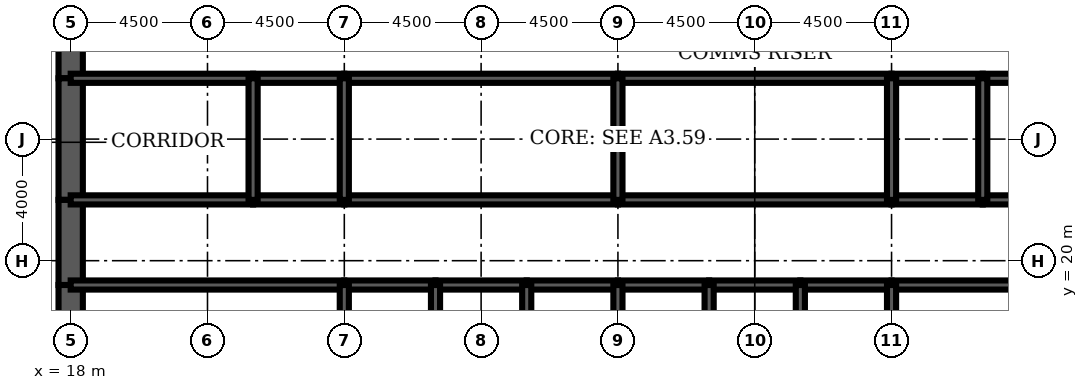
"""IFC4 building model, lengths in metres.
Left out: names, types, materials, properties, quantities, classifications, styles, units other than length and angle.
Written with IfcOpenShell. Run it as: python <this file> out.ifc"""

import sys

from ifc_helpers import new_model, si_unit, direction, frame, frame_2d, origin, place, context, subcontext, project, spatial, rectangle, extrude, element, fill, save


model = new_model("IFC4")
c1 = context("Model", 3, precision=1e-05, world=origin(), true_north=direction((0.0, 1.0)))
c2 = subcontext(c1, "Body", "Model", "MODEL_VIEW")
j1 = project(units=[si_unit("LENGTHUNIT", "METRE"), si_unit("PLANEANGLEUNIT", "RADIAN")], contexts=[c1])
p1 = place(None, origin())
s1 = spatial("IfcSite", under=j1, at=p1, CompositionType="ELEMENT")
p2 = place(p1, origin())
s2 = spatial("IfcBuilding", under=s1, at=p2, CompositionType="ELEMENT")
p3 = place(p2, frame((0.0, 0.0, 253.0)))
s3 = spatial("IfcBuildingStorey", under=s2, at=p3, CompositionType="ELEMENT", Elevation=253.0)
p4 = place(p3, frame((18.0, 28.8, 0.0), z_axis=(0.0, 0.0, 1.0), x_axis=(0.0, -1.0, 0.0)))
e1 = element("IfcWall", 1, at=p4, inside=s3, PredefinedType="SHEAR", context=c2, shape_type="SweptSolid", body=[
    extrude(rectangle(XDim=2.8, YDim=0.8, at=frame_2d((1.4, 0.0))), origin(), (0.0, 0.0, 1.0), 4.2),
])
p5 = place(p4, frame((0.4, 0.0, 0.0)))
e2 = element("IfcOpeningElement", 2, at=p5, cuts=e1, PredefinedType="OPENING", context=c2, shape_type="SweptSolid", body=[
    extrude(rectangle(XDim=1.8, YDim=2.1, at=frame_2d((0.9, 1.05))), frame((0.0, 0.41, 0.0), z_axis=(0.0, -1.0, 0.0), x_axis=(1.0, 0.0, 0.0)), (0.0, 0.0, 1.0), 0.82),
])
p6 = place(p3, frame((18.0, 26.0, 0.0), z_axis=(0.0, 0.0, 1.0), x_axis=(0.0, -1.0, 0.0)))
e3 = element("IfcWall", 3, at=p6, inside=s3, PredefinedType="SHEAR", context=c2, shape_type="SweptSolid", body=[
    extrude(rectangle(XDim=4.0, YDim=0.8, at=frame_2d((2.0, 0.0))), origin(), (0.0, 0.0, 1.0), 4.2),
])
p7 = place(p3, frame((18.0, 22.0, 0.0), z_axis=(0.0, 0.0, 1.0), x_axis=(0.0, -1.0, 0.0)))
e4 = element("IfcWall", 4, at=p7, inside=s3, PredefinedType="SHEAR", context=c2, shape_type="SweptSolid", body=[
    extrude(rectangle(XDim=2.8, YDim=0.8, at=frame_2d((1.4, 0.0))), origin(), (0.0, 0.0, 1.0), 4.2),
])
p8 = place(p7, frame((0.6, 0.0, 0.0)))
e5 = element("IfcOpeningElement", 5, at=p8, cuts=e4, PredefinedType="OPENING", context=c2, shape_type="SweptSolid", body=[
    extrude(rectangle(XDim=1.8, YDim=2.1, at=frame_2d((0.9, 1.05))), frame((0.0, 0.41, 0.0), z_axis=(0.0, -1.0, 0.0), x_axis=(1.0, 0.0, 0.0)), (0.0, 0.0, 1.0), 0.82),
])
p9 = place(p3, frame((18.0, 19.2, 0.0), z_axis=(0.0, 0.0, 1.0), x_axis=(0.0, -1.0, 0.0)))
e6 = element("IfcWall", 6, at=p9, inside=s3, PredefinedType="SHEAR", context=c2, shape_type="SweptSolid", body=[
    extrude(rectangle(XDim=3.2, YDim=0.8, at=frame_2d((1.6, 0.0))), origin(), (0.0, 0.0, 1.0), 4.2),
])
p10 = place(p3, frame((18.0, 19.2, 0.0), z_axis=(0.0, 0.0, 1.0), x_axis=(1.0, 0.0, 0.0)))
e7 = element("IfcWall", 7, at=p10, inside=s3, PredefinedType="SOLIDWALL", context=c2, shape_type="SweptSolid", body=[
    extrude(rectangle(XDim=9.0, YDim=0.3, at=frame_2d((4.5, 0.0))), origin(), (0.0, 0.0, 1.0), 4.2),
])
p11 = place(p10, frame((0.65, 0.0, 0.0)))
e8 = element("IfcOpeningElement", 8, at=p11, cuts=e7, PredefinedType="OPENING", context=c2, shape_type="SweptSolid", body=[
    extrude(rectangle(XDim=1.0, YDim=2.1, at=frame_2d((0.5, 1.05))), frame((0.0, 0.16, 0.0), z_axis=(0.0, -1.0, 0.0), x_axis=(1.0, 0.0, 0.0)), (0.0, 0.0, 1.0), 0.32),
])
p12 = place(p3, frame((27.0, 19.2, 0.0), z_axis=(0.0, 0.0, 1.0), x_axis=(1.0, 0.0, 0.0)))
e9 = element("IfcWall", 9, at=p12, inside=s3, PredefinedType="SOLIDWALL", context=c2, shape_type="SweptSolid", body=[
    extrude(rectangle(XDim=3.0, YDim=0.3, at=frame_2d((1.5, 0.0))), origin(), (0.0, 0.0, 1.0), 4.2),
])
p13 = place(p12, frame((0.95, 0.0, 0.0)))
e10 = element("IfcOpeningElement", 10, at=p13, cuts=e9, PredefinedType="OPENING", context=c2, shape_type="SweptSolid", body=[
    extrude(rectangle(XDim=1.1, YDim=2.2, at=frame_2d((0.55, 1.1))), frame((0.0, 0.16, 0.0), z_axis=(0.0, -1.0, 0.0), x_axis=(1.0, 0.0, 0.0)), (0.0, 0.0, 1.0), 0.32),
])
p14 = place(p3, frame((30.0, 19.2, 0.0), z_axis=(0.0, 0.0, 1.0), x_axis=(1.0, 0.0, 0.0)))
e11 = element("IfcWall", 11, at=p14, inside=s3, PredefinedType="SOLIDWALL", context=c2, shape_type="SweptSolid", body=[
    extrude(rectangle(XDim=3.0, YDim=0.3, at=frame_2d((1.5, 0.0))), origin(), (0.0, 0.0, 1.0), 4.2),
])
p15 = place(p14, frame((0.95, 0.0, 0.0)))
e12 = element("IfcOpeningElement", 12, at=p15, cuts=e11, PredefinedType="OPENING", context=c2, shape_type="SweptSolid", body=[
    extrude(rectangle(XDim=1.1, YDim=2.2, at=frame_2d((0.55, 1.1))), frame((0.0, 0.16, 0.0), z_axis=(0.0, -1.0, 0.0), x_axis=(1.0, 0.0, 0.0)), (0.0, 0.0, 1.0), 0.32),
])
p16 = place(p3, frame((33.0, 19.2, 0.0), z_axis=(0.0, 0.0, 1.0), x_axis=(1.0, 0.0, 0.0)))
e13 = element("IfcWall", 13, at=p16, inside=s3, PredefinedType="SOLIDWALL", context=c2, shape_type="SweptSolid", body=[
    extrude(rectangle(XDim=3.0, YDim=0.3, at=frame_2d((1.5, 0.0))), origin(), (0.0, 0.0, 1.0), 4.2),
])
p17 = place(p16, frame((0.95, 0.0, 0.0)))
e14 = element("IfcOpeningElement", 14, at=p17, cuts=e13, PredefinedType="OPENING", context=c2, shape_type="SweptSolid", body=[
    extrude(rectangle(XDim=1.1, YDim=2.2, at=frame_2d((0.55, 1.1))), frame((0.0, 0.16, 0.0), z_axis=(0.0, -1.0, 0.0), x_axis=(1.0, 0.0, 0.0)), (0.0, 0.0, 1.0), 0.32),
])
p18 = place(p3, frame((36.0, 19.2, 0.0), z_axis=(0.0, 0.0, 1.0), x_axis=(1.0, 0.0, 0.0)))
e15 = element("IfcWall", 15, at=p18, inside=s3, PredefinedType="SOLIDWALL", context=c2, shape_type="SweptSolid", body=[
    extrude(rectangle(XDim=3.0, YDim=0.3, at=frame_2d((1.5, 0.0))), origin(), (0.0, 0.0, 1.0), 4.2),
])
p19 = place(p18, frame((0.95, 0.0, 0.0)))
e16 = element("IfcOpeningElement", 16, at=p19, cuts=e15, PredefinedType="OPENING", context=c2, shape_type="SweptSolid", body=[
    extrude(rectangle(XDim=1.1, YDim=2.2, at=frame_2d((0.55, 1.1))), frame((0.0, 0.16, 0.0), z_axis=(0.0, -1.0, 0.0), x_axis=(1.0, 0.0, 0.0)), (0.0, 0.0, 1.0), 0.32),
])
p20 = place(p3, frame((39.0, 19.2, 0.0), z_axis=(0.0, 0.0, 1.0), x_axis=(1.0, 0.0, 0.0)))
e17 = element("IfcWall", 17, at=p20, inside=s3, PredefinedType="SOLIDWALL", context=c2, shape_type="SweptSolid", body=[
    extrude(rectangle(XDim=3.0, YDim=0.3, at=frame_2d((1.5, 0.0))), origin(), (0.0, 0.0, 1.0), 4.2),
])
p21 = place(p20, frame((1.0, 0.0, 0.0)))
e18 = element("IfcOpeningElement", 18, at=p21, cuts=e17, PredefinedType="OPENING", context=c2, shape_type="SweptSolid", body=[
    extrude(rectangle(XDim=1.0, YDim=2.1, at=frame_2d((0.5, 1.05))), frame((0.0, 0.16, 0.0), z_axis=(0.0, -1.0, 0.0), x_axis=(1.0, 0.0, 0.0)), (0.0, 0.0, 1.0), 0.32),
])
p22 = place(p3, frame((42.0, 19.2, 0.0), z_axis=(0.0, 0.0, 1.0), x_axis=(1.0, 0.0, 0.0)))
e19 = element("IfcWall", 19, at=p22, inside=s3, PredefinedType="SOLIDWALL", context=c2, shape_type="SweptSolid", body=[
    extrude(rectangle(XDim=3.0, YDim=0.3, at=frame_2d((1.5, 0.0))), origin(), (0.0, 0.0, 1.0), 4.2),
])
p23 = place(p22, frame((1.0, 0.0, 0.0)))
e20 = element("IfcOpeningElement", 20, at=p23, cuts=e19, PredefinedType="OPENING", context=c2, shape_type="SweptSolid", body=[
    extrude(rectangle(XDim=1.0, YDim=2.1, at=frame_2d((0.5, 1.05))), frame((0.0, 0.16, 0.0), z_axis=(0.0, -1.0, 0.0), x_axis=(1.0, 0.0, 0.0)), (0.0, 0.0, 1.0), 0.32),
])
p24 = place(p3, frame((45.0, 19.2, 0.0), z_axis=(0.0, 0.0, 1.0), x_axis=(1.0, 0.0, 0.0)))
e21 = element("IfcWall", 21, at=p24, inside=s3, PredefinedType="SOLIDWALL", context=c2, shape_type="SweptSolid", body=[
    extrude(rectangle(XDim=9.0, YDim=0.3, at=frame_2d((4.5, 0.0))), origin(), (0.0, 0.0, 1.0), 4.2),
])
p25 = place(p24, frame((7.35, 0.0, 0.0)))
e22 = element("IfcOpeningElement", 22, at=p25, cuts=e21, PredefinedType="OPENING", context=c2, shape_type="SweptSolid", body=[
    extrude(rectangle(XDim=1.0, YDim=2.1, at=frame_2d((0.5, 1.05))), frame((0.0, 0.16, 0.0), z_axis=(0.0, -1.0, 0.0), x_axis=(1.0, 0.0, 0.0)), (0.0, 0.0, 1.0), 0.32),
])
p26 = place(p3, frame((18.0, 22.0, 0.0), z_axis=(0.0, 0.0, 1.0), x_axis=(1.0, 0.0, 0.0)))
e23 = element("IfcWall", 23, at=p26, inside=s3, PredefinedType="SOLIDWALL", context=c2, shape_type="SweptSolid", body=[
    extrude(rectangle(XDim=6.0, YDim=0.3, at=frame_2d((3.0, 0.0))), origin(), (0.0, 0.0, 1.0), 4.2),
])
p27 = place(p26, frame((2.0, 0.0, 0.0)))
e24 = element("IfcOpeningElement", 24, at=p27, cuts=e23, PredefinedType="OPENING", context=c2, shape_type="SweptSolid", body=[
    extrude(rectangle(XDim=1.0, YDim=2.1, at=frame_2d((0.5, 1.05))), frame((0.0, 0.16, 0.0), z_axis=(0.0, -1.0, 0.0), x_axis=(1.0, 0.0, 0.0)), (0.0, 0.0, 1.0), 0.32),
])
p28 = place(p3, frame((24.0, 22.0, 0.0), z_axis=(0.0, 0.0, 1.0), x_axis=(1.0, 0.0, 0.0)))
e25 = element("IfcWall", 25, at=p28, inside=s3, PredefinedType="SOLIDWALL", context=c2, shape_type="SweptSolid", body=[
    extrude(rectangle(XDim=3.0, YDim=0.3, at=frame_2d((1.5, 0.0))), origin(), (0.0, 0.0, 1.0), 4.2),
])
p29 = place(p28, frame((1.0, 0.0, 0.0)))
e26 = element("IfcOpeningElement", 26, at=p29, cuts=e25, PredefinedType="OPENING", context=c2, shape_type="SweptSolid", body=[
    extrude(rectangle(XDim=1.0, YDim=2.1, at=frame_2d((0.5, 1.05))), frame((0.0, 0.16, 0.0), z_axis=(0.0, -1.0, 0.0), x_axis=(1.0, 0.0, 0.0)), (0.0, 0.0, 1.0), 0.32),
])
p30 = place(p3, frame((27.0, 22.0, 0.0), z_axis=(0.0, 0.0, 1.0), x_axis=(1.0, 0.0, 0.0)))
e27 = element("IfcWall", 27, at=p30, inside=s3, PredefinedType="SOLIDWALL", context=c2, shape_type="SweptSolid", body=[
    extrude(rectangle(XDim=9.0, YDim=0.3, at=frame_2d((4.5, 0.0))), origin(), (0.0, 0.0, 1.0), 4.2),
])
p31 = place(p30, frame((4.0, 0.0, 0.0)))
e28 = element("IfcOpeningElement", 28, at=p31, cuts=e27, PredefinedType="OPENING", context=c2, shape_type="SweptSolid", body=[
    extrude(rectangle(XDim=1.0, YDim=2.1, at=frame_2d((0.5, 1.05))), frame((0.0, 0.16, 0.0), z_axis=(0.0, -1.0, 0.0), x_axis=(1.0, 0.0, 0.0)), (0.0, 0.0, 1.0), 0.32),
])
p32 = place(p3, frame((36.0, 22.0, 0.0), z_axis=(0.0, 0.0, 1.0), x_axis=(1.0, 0.0, 0.0)))
e29 = element("IfcWall", 29, at=p32, inside=s3, PredefinedType="SOLIDWALL", context=c2, shape_type="SweptSolid", body=[
    extrude(rectangle(XDim=9.0, YDim=0.3, at=frame_2d((4.5, 0.0))), origin(), (0.0, 0.0, 1.0), 4.2),
])
p33 = place(p32, frame((4.0, 0.0, 0.0)))
e30 = element("IfcOpeningElement", 30, at=p33, cuts=e29, PredefinedType="OPENING", context=c2, shape_type="SweptSolid", body=[
    extrude(rectangle(XDim=1.0, YDim=2.1, at=frame_2d((0.5, 1.05))), frame((0.0, 0.16, 0.0), z_axis=(0.0, -1.0, 0.0), x_axis=(1.0, 0.0, 0.0)), (0.0, 0.0, 1.0), 0.32),
])
p34 = place(p3, frame((45.0, 22.0, 0.0), z_axis=(0.0, 0.0, 1.0), x_axis=(1.0, 0.0, 0.0)))
e31 = element("IfcWall", 31, at=p34, inside=s3, PredefinedType="SOLIDWALL", context=c2, shape_type="SweptSolid", body=[
    extrude(rectangle(XDim=3.0, YDim=0.3, at=frame_2d((1.5, 0.0))), origin(), (0.0, 0.0, 1.0), 4.2),
])
p35 = place(p34, frame((1.0, 0.0, 0.0)))
e32 = element("IfcOpeningElement", 32, at=p35, cuts=e31, PredefinedType="OPENING", context=c2, shape_type="SweptSolid", body=[
    extrude(rectangle(XDim=1.0, YDim=2.1, at=frame_2d((0.5, 1.05))), frame((0.0, 0.16, 0.0), z_axis=(0.0, -1.0, 0.0), x_axis=(1.0, 0.0, 0.0)), (0.0, 0.0, 1.0), 0.32),
])
p36 = place(p3, frame((48.0, 22.0, 0.0), z_axis=(0.0, 0.0, 1.0), x_axis=(1.0, 0.0, 0.0)))
e33 = element("IfcWall", 33, at=p36, inside=s3, PredefinedType="SOLIDWALL", context=c2, shape_type="SweptSolid", body=[
    extrude(rectangle(XDim=6.0, YDim=0.3, at=frame_2d((3.0, 0.0))), origin(), (0.0, 0.0, 1.0), 4.2),
])
p37 = place(p36, frame((2.0, 0.0, 0.0)))
e34 = element("IfcOpeningElement", 34, at=p37, cuts=e33, PredefinedType="OPENING", context=c2, shape_type="SweptSolid", body=[
    extrude(rectangle(XDim=1.0, YDim=2.1, at=frame_2d((0.5, 1.05))), frame((0.0, 0.16, 0.0), z_axis=(0.0, -1.0, 0.0), x_axis=(1.0, 0.0, 0.0)), (0.0, 0.0, 1.0), 0.32),
])
p38 = place(p36, frame((4.2, 0.0, 0.0)))
e35 = element("IfcOpeningElement", 35, at=p38, cuts=e33, PredefinedType="OPENING", context=c2, shape_type="SweptSolid", body=[
    extrude(rectangle(XDim=1.0, YDim=2.1, at=frame_2d((0.5, 1.05))), frame((0.0, 0.16, 0.0), z_axis=(0.0, -1.0, 0.0), x_axis=(1.0, 0.0, 0.0)), (0.0, 0.0, 1.0), 0.32),
])
p39 = place(p3, frame((18.0, 26.0, 0.0), z_axis=(0.0, 0.0, 1.0), x_axis=(1.0, 0.0, 0.0)))
e36 = element("IfcWall", 36, at=p39, inside=s3, PredefinedType="SOLIDWALL", context=c2, shape_type="SweptSolid", body=[
    extrude(rectangle(XDim=6.0, YDim=0.3, at=frame_2d((3.0, 0.0))), origin(), (0.0, 0.0, 1.0), 4.2),
])
p40 = place(p3, frame((24.0, 26.0, 0.0), z_axis=(0.0, 0.0, 1.0), x_axis=(1.0, 0.0, 0.0)))
e37 = element("IfcWall", 37, at=p40, inside=s3, PredefinedType="SOLIDWALL", context=c2, shape_type="SweptSolid", body=[
    extrude(rectangle(XDim=3.0, YDim=0.3, at=frame_2d((1.5, 0.0))), origin(), (0.0, 0.0, 1.0), 4.2),
])
for number, where, z_axis, x_axis in (
    (38, (27.0, 26.0, 0.0), (0.0, 0.0, 1.0), (1.0, 0.0, 0.0)),
    (39, (36.0, 26.0, 0.0), (0.0, 0.0, 1.0), (1.0, 0.0, 0.0)),
):
    element("IfcWall", number, at=place(p3, frame(where, z_axis=z_axis, x_axis=x_axis)), inside=s3, PredefinedType="SOLIDWALL", context=c2, shape_type="SweptSolid", body=[
        extrude(rectangle(XDim=9.0, YDim=0.3, at=frame_2d((4.5, 0.0))), origin(), (0.0, 0.0, 1.0), 4.2),
    ])
p41 = place(p3, frame((45.0, 26.0, 0.0), z_axis=(0.0, 0.0, 1.0), x_axis=(1.0, 0.0, 0.0)))
e40 = element("IfcWall", 40, at=p41, inside=s3, PredefinedType="SOLIDWALL", context=c2, shape_type="SweptSolid", body=[
    extrude(rectangle(XDim=3.0, YDim=0.3, at=frame_2d((1.5, 0.0))), origin(), (0.0, 0.0, 1.0), 4.2),
])
p42 = place(p3, frame((48.0, 26.0, 0.0), z_axis=(0.0, 0.0, 1.0), x_axis=(1.0, 0.0, 0.0)))
e41 = element("IfcWall", 41, at=p42, inside=s3, PredefinedType="SOLIDWALL", context=c2, shape_type="SweptSolid", body=[
    extrude(rectangle(XDim=6.0, YDim=0.3, at=frame_2d((3.0, 0.0))), origin(), (0.0, 0.0, 1.0), 4.2),
])
for number, where, z_axis, x_axis in (
    (42, (27.0, 16.0, 0.0), (0.0, 0.0, 1.0), (0.0, 1.0, 0.0)),
    (43, (30.0, 16.0, 0.0), (0.0, 0.0, 1.0), (0.0, 1.0, 0.0)),
    (44, (33.0, 16.0, 0.0), (0.0, 0.0, 1.0), (0.0, 1.0, 0.0)),
    (45, (36.0, 16.0, 0.0), (0.0, 0.0, 1.0), (0.0, 1.0, 0.0)),
    (46, (39.0, 16.0, 0.0), (0.0, 0.0, 1.0), (0.0, 1.0, 0.0)),
    (47, (42.0, 16.0, 0.0), (0.0, 0.0, 1.0), (0.0, 1.0, 0.0)),
    (48, (45.0, 16.0, 0.0), (0.0, 0.0, 1.0), (0.0, 1.0, 0.0)),
):
    element("IfcWall", number, at=place(p3, frame(where, z_axis=z_axis, x_axis=x_axis)), inside=s3, PredefinedType="SOLIDWALL", context=c2, shape_type="SweptSolid", body=[
        extrude(rectangle(XDim=3.2, YDim=0.3, at=frame_2d((1.6, 0.0))), origin(), (0.0, 0.0, 1.0), 4.2),
    ])
for number, where, z_axis, x_axis in (
    (49, (24.0, 22.0, 0.0), (0.0, 0.0, 1.0), (0.0, 1.0, 0.0)),
    (50, (27.0, 22.0, 0.0), (0.0, 0.0, 1.0), (0.0, 1.0, 0.0)),
    (51, (36.0, 22.0, 0.0), (0.0, 0.0, 1.0), (0.0, 1.0, 0.0)),
    (52, (45.0, 22.0, 0.0), (0.0, 0.0, 1.0), (0.0, 1.0, 0.0)),
    (53, (48.0, 22.0, 0.0), (0.0, 0.0, 1.0), (0.0, 1.0, 0.0)),
):
    element("IfcWall", number, at=place(p3, frame(where, z_axis=z_axis, x_axis=x_axis)), inside=s3, PredefinedType="SOLIDWALL", context=c2, shape_type="SweptSolid", body=[
        extrude(rectangle(XDim=4.0, YDim=0.3, at=frame_2d((2.0, 0.0))), origin(), (0.0, 0.0, 1.0), 4.2),
    ])
p43 = place(p3, frame((42.5, 22.15, 0.0), z_axis=(0.0, 0.0, 1.0), x_axis=(0.0, 1.0, 0.0)))
e54 = element("IfcWall", 54, at=p43, inside=s3, PredefinedType="PARTITIONING", context=c2, shape_type="SweptSolid", body=[
    extrude(rectangle(XDim=3.7, YDim=0.15, at=frame_2d((1.85, 0.0))), origin(), (0.0, 0.0, 1.0), 3.0),
])
p44 = place(p43, frame((2.2, 0.0, 0.0)))
e55 = element("IfcOpeningElement", 55, at=p44, cuts=e54, PredefinedType="OPENING", context=c2, shape_type="SweptSolid", body=[
    extrude(rectangle(XDim=1.0, YDim=2.1, at=frame_2d((0.5, 1.05))), frame((0.0, 0.085, 0.0), z_axis=(0.0, -1.0, 0.0), x_axis=(1.0, 0.0, 0.0)), (0.0, 0.0, 1.0), 0.17),
])
p45 = place(p3, frame((24.5, 19.35, 0.0), z_axis=(0.0, 0.0, 1.0), x_axis=(0.0, 1.0, 0.0)))
e56 = element("IfcWall", 56, at=p45, inside=s3, PredefinedType="PARTITIONING", context=c2, shape_type="SweptSolid", body=[
    extrude(rectangle(XDim=2.5, YDim=0.15, at=frame_2d((1.25, 0.0))), origin(), (0.0, 0.0, 1.0), 3.0),
])
p46 = place(p45, frame((1.15, 0.0, 0.0)))
e57 = element("IfcOpeningElement", 57, at=p46, cuts=e56, PredefinedType="OPENING", context=c2, shape_type="SweptSolid", body=[
    extrude(rectangle(XDim=1.0, YDim=2.1, at=frame_2d((0.5, 1.05))), frame((0.0, 0.085, 0.0), z_axis=(0.0, -1.0, 0.0), x_axis=(1.0, 0.0, 0.0)), (0.0, 0.0, 1.0), 0.17),
])
p47 = place(p44, origin())
e58 = element("IfcDoor", 58, at=p47, inside=s3, OperationType="SINGLE_SWING_RIGHT", PredefinedType="DOOR", context=c2, shape_type="SweptSolid", body=[
    extrude(rectangle(XDim=1.0, YDim=2.1, at=frame_2d((0.5, 1.05))), frame((0.0, 0.025, 0.0), z_axis=(0.0, -1.0, 0.0), x_axis=(1.0, 0.0, 0.0)), (0.0, 0.0, 1.0), 0.05),
])
fill(e55, e58)
p48 = place(p46, origin())
e59 = element("IfcDoor", 59, at=p48, inside=s3, OperationType="SINGLE_SWING_RIGHT", PredefinedType="DOOR", context=c2, shape_type="SweptSolid", body=[
    extrude(rectangle(XDim=1.0, YDim=2.1, at=frame_2d((0.5, 1.05))), frame((0.0, 0.025, 0.0), z_axis=(0.0, -1.0, 0.0), x_axis=(1.0, 0.0, 0.0)), (0.0, 0.0, 1.0), 0.05),
])
fill(e57, e59)
p49 = place(p13, origin())
e60 = element("IfcDoor", 60, at=p49, inside=s3, OperationType="DOUBLE_DOOR_SLIDING", PredefinedType="USERDEFINED", context=c2, shape_type="SweptSolid", body=[
    extrude(rectangle(XDim=1.1, YDim=2.2, at=frame_2d((0.55, 1.1))), frame((0.0, 0.025, 0.0), z_axis=(0.0, -1.0, 0.0), x_axis=(1.0, 0.0, 0.0)), (0.0, 0.0, 1.0), 0.05),
])
fill(e10, e60)
p50 = place(p15, origin())
e61 = element("IfcDoor", 61, at=p50, inside=s3, OperationType="DOUBLE_DOOR_SLIDING", PredefinedType="USERDEFINED", context=c2, shape_type="SweptSolid", body=[
    extrude(rectangle(XDim=1.1, YDim=2.2, at=frame_2d((0.55, 1.1))), frame((0.0, 0.025, 0.0), z_axis=(0.0, -1.0, 0.0), x_axis=(1.0, 0.0, 0.0)), (0.0, 0.0, 1.0), 0.05),
])
fill(e12, e61)
p51 = place(p17, origin())
e62 = element("IfcDoor", 62, at=p51, inside=s3, OperationType="DOUBLE_DOOR_SLIDING", PredefinedType="USERDEFINED", context=c2, shape_type="SweptSolid", body=[
    extrude(rectangle(XDim=1.1, YDim=2.2, at=frame_2d((0.55, 1.1))), frame((0.0, 0.025, 0.0), z_axis=(0.0, -1.0, 0.0), x_axis=(1.0, 0.0, 0.0)), (0.0, 0.0, 1.0), 0.05),
])
fill(e14, e62)
p52 = place(p19, origin())
e63 = element("IfcDoor", 63, at=p52, inside=s3, OperationType="DOUBLE_DOOR_SLIDING", PredefinedType="USERDEFINED", context=c2, shape_type="SweptSolid", body=[
    extrude(rectangle(XDim=1.1, YDim=2.2, at=frame_2d((0.55, 1.1))), frame((0.0, 0.025, 0.0), z_axis=(0.0, -1.0, 0.0), x_axis=(1.0, 0.0, 0.0)), (0.0, 0.0, 1.0), 0.05),
])
fill(e16, e63)
p53 = place(p11, origin())
e64 = element("IfcDoor", 64, at=p53, inside=s3, OperationType="SINGLE_SWING_LEFT", PredefinedType="DOOR", context=c2, shape_type="SweptSolid", body=[
    extrude(rectangle(XDim=1.0, YDim=2.1, at=frame_2d((0.5, 1.05))), frame((0.0, 0.025, 0.0), z_axis=(0.0, -1.0, 0.0), x_axis=(1.0, 0.0, 0.0)), (0.0, 0.0, 1.0), 0.05),
])
fill(e8, e64)
p54 = place(p8, origin())
e65 = element("IfcDoor", 65, at=p54, inside=s3, OperationType="SINGLE_SWING_LEFT", PredefinedType="DOOR", context=c2, shape_type="SweptSolid", body=[
    extrude(rectangle(XDim=1.8, YDim=2.1, at=frame_2d((0.9, 1.05))), frame((0.0, 0.4, 0.0), z_axis=(0.0, -1.0, 0.0), x_axis=(1.0, 0.0, 0.0)), (0.0, 0.0, 1.0), 0.8),
])
fill(e5, e65)
p55 = place(p5, origin())
e66 = element("IfcDoor", 66, at=p55, inside=s3, OperationType="SINGLE_SWING_LEFT", PredefinedType="DOOR", context=c2, shape_type="SweptSolid", body=[
    extrude(rectangle(XDim=1.8, YDim=2.1, at=frame_2d((0.9, 1.05))), frame((0.0, 0.4, 0.0), z_axis=(0.0, -1.0, 0.0), x_axis=(1.0, 0.0, 0.0)), (0.0, 0.0, 1.0), 0.8),
])
fill(e2, e66)
p56 = place(p27, origin())
e67 = element("IfcDoor", 67, at=p56, inside=s3, OperationType="SINGLE_SWING_LEFT", PredefinedType="DOOR", context=c2, shape_type="SweptSolid", body=[
    extrude(rectangle(XDim=1.0, YDim=2.1, at=frame_2d((0.5, 1.05))), frame((0.0, 0.025, 0.0), z_axis=(0.0, -1.0, 0.0), x_axis=(1.0, 0.0, 0.0)), (0.0, 0.0, 1.0), 0.05),
])
fill(e24, e67)
p57 = place(p29, origin())
e68 = element("IfcDoor", 68, at=p57, inside=s3, OperationType="SINGLE_SWING_LEFT", PredefinedType="DOOR", context=c2, shape_type="SweptSolid", body=[
    extrude(rectangle(XDim=1.0, YDim=2.1, at=frame_2d((0.5, 1.05))), frame((0.0, 0.025, 0.0), z_axis=(0.0, -1.0, 0.0), x_axis=(1.0, 0.0, 0.0)), (0.0, 0.0, 1.0), 0.05),
])
fill(e26, e68)
p58 = place(p31, origin())
e69 = element("IfcDoor", 69, at=p58, inside=s3, OperationType="SINGLE_SWING_LEFT", PredefinedType="DOOR", context=c2, shape_type="SweptSolid", body=[
    extrude(rectangle(XDim=1.0, YDim=2.1, at=frame_2d((0.5, 1.05))), frame((0.0, 0.025, 0.0), z_axis=(0.0, -1.0, 0.0), x_axis=(1.0, 0.0, 0.0)), (0.0, 0.0, 1.0), 0.05),
])
fill(e28, e69)
p59 = place(p33, origin())
e70 = element("IfcDoor", 70, at=p59, inside=s3, OperationType="SINGLE_SWING_LEFT", PredefinedType="DOOR", context=c2, shape_type="SweptSolid", body=[
    extrude(rectangle(XDim=1.0, YDim=2.1, at=frame_2d((0.5, 1.05))), frame((0.0, 0.025, 0.0), z_axis=(0.0, -1.0, 0.0), x_axis=(1.0, 0.0, 0.0)), (0.0, 0.0, 1.0), 0.05),
])
fill(e30, e70)
p60 = place(p35, origin())
e71 = element("IfcDoor", 71, at=p60, inside=s3, OperationType="SINGLE_SWING_LEFT", PredefinedType="DOOR", context=c2, shape_type="SweptSolid", body=[
    extrude(rectangle(XDim=1.0, YDim=2.1, at=frame_2d((0.5, 1.05))), frame((0.0, 0.025, 0.0), z_axis=(0.0, -1.0, 0.0), x_axis=(1.0, 0.0, 0.0)), (0.0, 0.0, 1.0), 0.05),
])
fill(e32, e71)
p61 = place(p21, origin())
e72 = element("IfcDoor", 72, at=p61, inside=s3, OperationType="SINGLE_SWING_LEFT", PredefinedType="DOOR", context=c2, shape_type="SweptSolid", body=[
    extrude(rectangle(XDim=1.0, YDim=2.1, at=frame_2d((0.5, 1.05))), frame((0.0, 0.025, 0.0), z_axis=(0.0, -1.0, 0.0), x_axis=(1.0, 0.0, 0.0)), (0.0, 0.0, 1.0), 0.05),
])
fill(e18, e72)
p62 = place(p23, origin())
e73 = element("IfcDoor", 73, at=p62, inside=s3, OperationType="SINGLE_SWING_LEFT", PredefinedType="DOOR", context=c2, shape_type="SweptSolid", body=[
    extrude(rectangle(XDim=1.0, YDim=2.1, at=frame_2d((0.5, 1.05))), frame((0.0, 0.025, 0.0), z_axis=(0.0, -1.0, 0.0), x_axis=(1.0, 0.0, 0.0)), (0.0, 0.0, 1.0), 0.05),
])
fill(e20, e73)
save(model, sys.argv[1])
